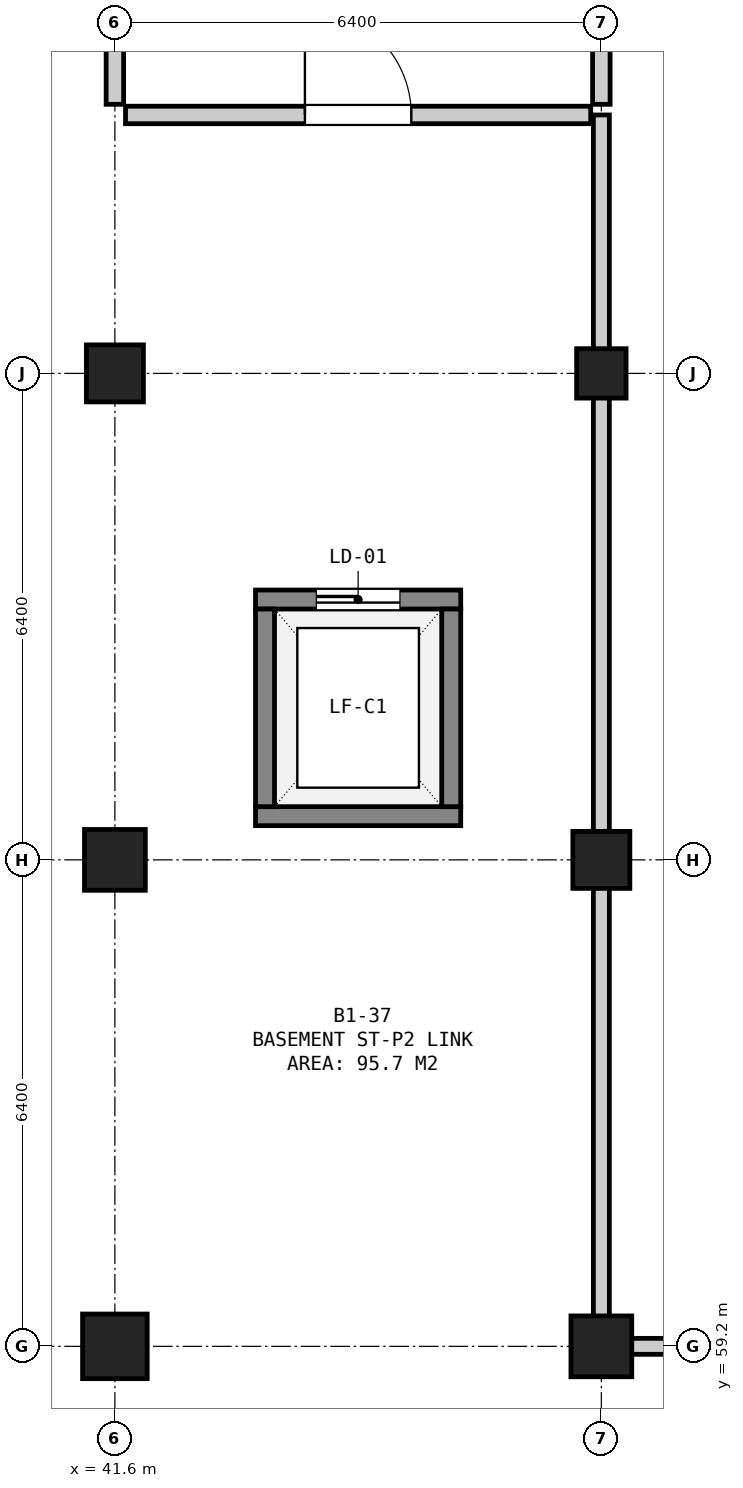
"""IFC4 building model, lengths in metres.
Left out: names, types, materials, properties, quantities, classifications, styles, units other than length and angle.
Written with IfcOpenShell. Run it as: python <this file> out.ifc"""

import sys

from ifc_helpers import new_model, si_unit, direction, frame, frame_2d, origin, origin_2d, place, context, subcontext, project, spatial, rectangle, extrude, element, fill, save


model = new_model("IFC4")
c1 = context("Model", 3, precision=1e-05, world=origin(), true_north=direction((0.0, 1.0)))
c2 = subcontext(c1, "Body", "Model", "MODEL_VIEW")
j1 = project(units=[si_unit("LENGTHUNIT", "METRE"), si_unit("PLANEANGLEUNIT", "RADIAN")], contexts=[c1])
p1 = place(None, origin())
s1 = spatial("IfcSite", under=j1, at=p1, CompositionType="ELEMENT")
p2 = place(p1, origin())
s2 = spatial("IfcBuilding", under=s1, at=p2, CompositionType="ELEMENT")
p3 = place(p2, frame((0.0, 0.0, -4.5)))
s3 = spatial("IfcBuildingStorey", under=s2, at=p3, CompositionType="ELEMENT", Elevation=-4.5)
p4 = place(p3, frame((41.6, 59.2, 0.0), z_axis=(0.0, 0.0, 1.0), x_axis=(1.0, 0.0, 0.0)))
e1 = element("IfcColumn", 1, at=p4, inside=s3, PredefinedType="COLUMN", context=c2, shape_type="SweptSolid", body=[
    extrude(rectangle(XDim=0.85, YDim=0.85, at=origin_2d()), origin(), (0.0, 0.0, 1.0), 4.5),
])
p5 = place(p3, frame((41.6, 65.6, 0.0), z_axis=(0.0, 0.0, 1.0), x_axis=(1.0, 0.0, 0.0)))
e2 = element("IfcColumn", 2, at=p5, inside=s3, PredefinedType="COLUMN", context=c2, shape_type="SweptSolid", body=[
    extrude(rectangle(XDim=0.8, YDim=0.8, at=origin_2d()), origin(), (0.0, 0.0, 1.0), 4.5),
])
p6 = place(p3, frame((41.6, 72.0, 0.0), z_axis=(0.0, 0.0, 1.0), x_axis=(1.0, 0.0, 0.0)))
e3 = element("IfcColumn", 3, at=p6, inside=s3, PredefinedType="COLUMN", context=c2, shape_type="SweptSolid", body=[
    extrude(rectangle(XDim=0.75, YDim=0.75, at=origin_2d()), origin(), (0.0, 0.0, 1.0), 4.5),
])
p7 = place(p3, frame((48.0, 59.2, 0.0), z_axis=(0.0, 0.0, 1.0), x_axis=(1.0, 0.0, 0.0)))
e4 = element("IfcColumn", 4, at=p7, inside=s3, PredefinedType="COLUMN", context=c2, shape_type="SweptSolid", body=[
    extrude(rectangle(XDim=0.8, YDim=0.8, at=origin_2d()), origin(), (0.0, 0.0, 1.0), 4.5),
])
p8 = place(p3, frame((48.0, 65.6, 0.0), z_axis=(0.0, 0.0, 1.0), x_axis=(1.0, 0.0, 0.0)))
e5 = element("IfcColumn", 5, at=p8, inside=s3, PredefinedType="COLUMN", context=c2, shape_type="SweptSolid", body=[
    extrude(rectangle(XDim=0.75, YDim=0.75, at=origin_2d()), origin(), (0.0, 0.0, 1.0), 4.5),
])
p9 = place(p3, frame((48.0, 72.0, 0.0), z_axis=(0.0, 0.0, 1.0), x_axis=(1.0, 0.0, 0.0)))
e6 = element("IfcColumn", 6, at=p9, inside=s3, PredefinedType="COLUMN", context=c2, shape_type="SweptSolid", body=[
    extrude(rectangle(XDim=0.65, YDim=0.65, at=origin_2d()), origin(), (0.0, 0.0, 1.0), 4.5),
])
p10 = place(p3, frame((43.45, 66.175, 0.0), z_axis=(0.0, 0.0, 1.0), x_axis=(1.0, 0.0, 0.0)))
e7 = element("IfcWall", 7, at=p10, inside=s3, PredefinedType="SHEAR", context=c2, shape_type="SweptSolid", body=[
    extrude(rectangle(XDim=2.7, YDim=0.25, at=frame_2d((1.35, 0.0))), origin(), (0.0, 0.0, 1.0), 4.08),
])
p11 = place(p3, frame((43.45, 69.025, 0.0), z_axis=(0.0, 0.0, 1.0), x_axis=(1.0, 0.0, 0.0)))
e8 = element("IfcWall", 8, at=p11, inside=s3, PredefinedType="SHEAR", context=c2, shape_type="SweptSolid", body=[
    extrude(rectangle(XDim=2.7, YDim=0.25, at=frame_2d((1.35, 0.0))), origin(), (0.0, 0.0, 1.0), 4.08),
])
p12 = place(p11, frame((0.8, 0.0, 0.0)))
e9 = element("IfcOpeningElement", 9, at=p12, cuts=e8, PredefinedType="OPENING", context=c2, shape_type="SweptSolid", body=[
    extrude(rectangle(XDim=1.1, YDim=2.15, at=frame_2d((0.55, 1.075))), frame((0.0, 0.137, 0.0), z_axis=(0.0, -1.0, 0.0), x_axis=(1.0, 0.0, 0.0)), (0.0, 0.0, 1.0), 0.274),
])
for number, where, z_axis, x_axis in (
    (10, (43.575, 66.3, 0.0), (0.0, 0.0, 1.0), (0.0, 1.0, 0.0)),
    (11, (46.025, 66.3, 0.0), (0.0, 0.0, 1.0), (0.0, 1.0, 0.0)),
):
    element("IfcWall", number, at=place(p3, frame(where, z_axis=z_axis, x_axis=x_axis)), inside=s3, PredefinedType="SHEAR", context=c2, shape_type="SweptSolid", body=[
        extrude(rectangle(XDim=2.6, YDim=0.25, at=frame_2d((1.3, 0.0))), origin(), (0.0, 0.0, 1.0), 4.08),
    ])
p13 = place(p3, frame((41.74, 75.4, 0.0), z_axis=(0.0, 0.0, 1.0), x_axis=(1.0, 0.0, 0.0)))
e12 = element("IfcWall", 12, at=p13, inside=s3, PredefinedType="SOLIDWALL", context=c2, shape_type="SweptSolid", body=[
    extrude(rectangle(XDim=6.12, YDim=0.23, at=frame_2d((3.06, 0.0))), origin(), (0.0, 0.0, 1.0), 4.08),
])
p14 = place(p13, frame((2.36, 0.0, 0.0)))
e13 = element("IfcOpeningElement", 13, at=p14, cuts=e12, PredefinedType="OPENING", context=c2, shape_type="SweptSolid", body=[
    extrude(rectangle(XDim=1.4, YDim=2.2, at=frame_2d((0.7, 1.1))), frame((0.0, 0.127, 0.0), z_axis=(0.0, -1.0, 0.0), x_axis=(1.0, 0.0, 0.0)), (0.0, 0.0, 1.0), 0.254),
])
p15 = place(p3, frame((41.6, 75.54, 0.0), z_axis=(0.0, 0.0, 1.0), x_axis=(0.0, 1.0, 0.0)))
e14 = element("IfcWall", 14, at=p15, inside=s3, PredefinedType="SOLIDWALL", context=c2, shape_type="SweptSolid", body=[
    extrude(rectangle(XDim=3.52, YDim=0.23, at=frame_2d((1.76, 0.0))), origin(), (0.0, 0.0, 1.0), 3.375),
])
p16 = place(p3, frame((48.0, 75.54, 0.0), z_axis=(0.0, 0.0, 1.0), x_axis=(0.0, 1.0, 0.0)))
e15 = element("IfcWall", 15, at=p16, inside=s3, PredefinedType="SOLIDWALL", context=c2, shape_type="SweptSolid", body=[
    extrude(rectangle(XDim=3.52, YDim=0.23, at=frame_2d((1.76, 0.0))), origin(), (0.0, 0.0, 1.0), 3.425),
])
p17 = place(p3, frame((48.14, 59.2, 0.0), z_axis=(0.0, 0.0, 1.0), x_axis=(1.0, 0.0, 0.0)))
e16 = element("IfcWall", 16, at=p17, inside=s3, PredefinedType="SOLIDWALL", context=c2, shape_type="SweptSolid", body=[
    extrude(rectangle(XDim=24.12, YDim=0.21, at=frame_2d((12.06, 0.0))), origin(), (0.0, 0.0, 1.0), 2.925),
])
p18 = place(p17, frame((17.56, 0.0, 0.0)))
e17 = element("IfcOpeningElement", 17, at=p18, cuts=e16, PredefinedType="OPENING", context=c2, shape_type="SweptSolid", body=[
    extrude(rectangle(XDim=1.4, YDim=2.2, at=frame_2d((0.7, 1.1))), frame((0.0, 0.117, 0.0), z_axis=(0.0, -1.0, 0.0), x_axis=(1.0, 0.0, 0.0)), (0.0, 0.0, 1.0), 0.234),
])
p19 = place(p3, frame((48.0, 59.34, 0.0), z_axis=(0.0, 0.0, 1.0), x_axis=(0.0, 1.0, 0.0)))
e18 = element("IfcWall", 18, at=p19, inside=s3, PredefinedType="SOLIDWALL", context=c2, shape_type="SweptSolid", body=[
    extrude(rectangle(XDim=16.06, YDim=0.21, at=frame_2d((8.03, 0.0))), origin(), (0.0, 0.0, 1.0), 3.275),
])
p20 = place(p12, origin())
e19 = element("IfcDoor", 19, at=p20, inside=s3, OperationType="SLIDING_TO_LEFT", PredefinedType="DOOR", context=c2, shape_type="SweptSolid", body=[
    extrude(rectangle(XDim=1.1, YDim=2.15, at=frame_2d((0.55, 1.075))), frame((0.0, 0.025, 0.0), z_axis=(0.0, -1.0, 0.0), x_axis=(1.0, 0.0, 0.0)), (0.0, 0.0, 1.0), 0.05),
])
fill(e9, e19)
p21 = place(p14, origin())
e20 = element("IfcDoor", 20, at=p21, inside=s3, OperationType="SINGLE_SWING_LEFT", PredefinedType="DOOR", context=c2, shape_type="SweptSolid", body=[
    extrude(rectangle(XDim=1.4, YDim=2.2, at=frame_2d((0.7, 1.1))), frame((0.0, 0.025, 0.0), z_axis=(0.0, -1.0, 0.0), x_axis=(1.0, 0.0, 0.0)), (0.0, 0.0, 1.0), 0.05),
])
fill(e13, e20)
save(model, sys.argv[1])
